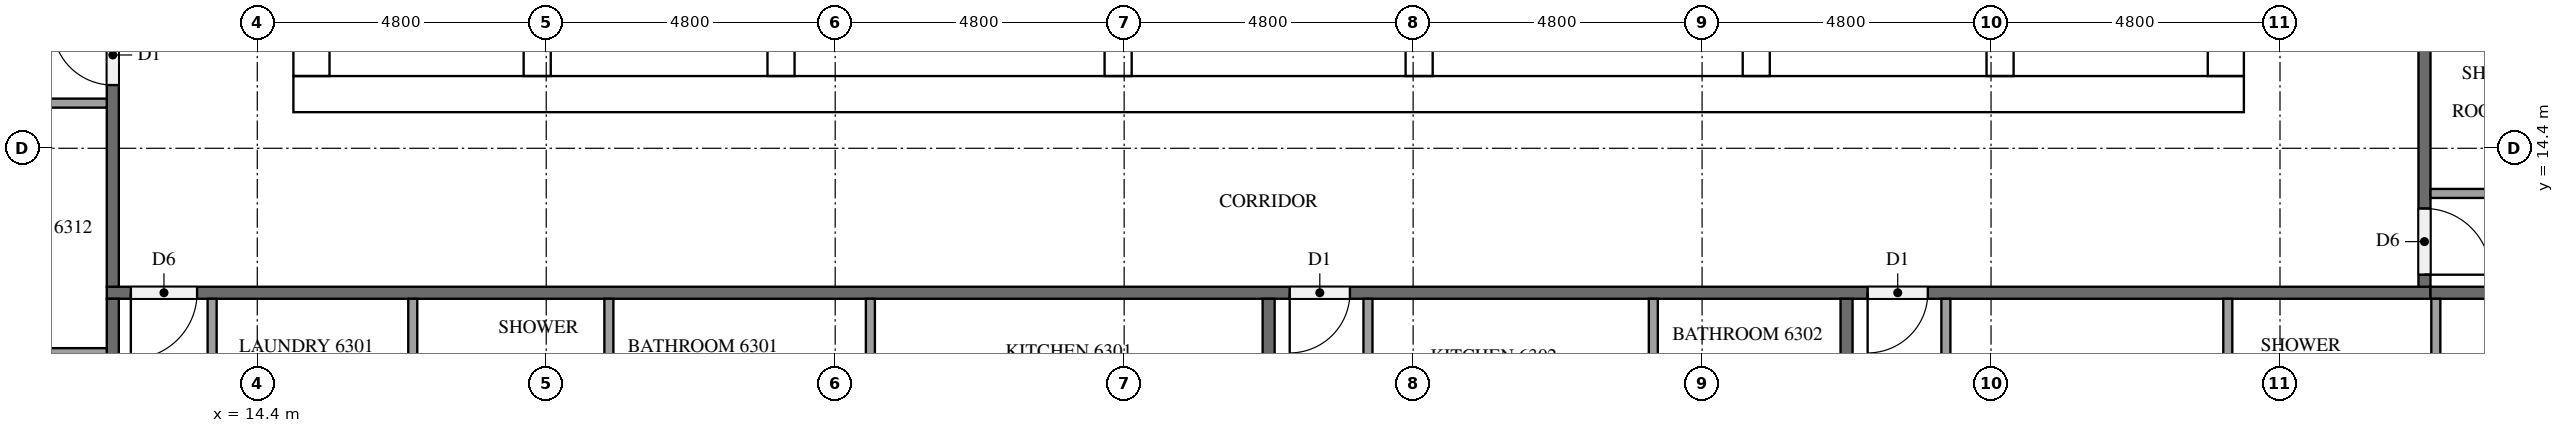
"""IFC4 building model, lengths in metres.
Left out: names, types, materials, properties, quantities, classifications, styles, units other than length and angle.
Written with IfcOpenShell. Run it as: python <this file> out.ifc"""

import sys

from ifc_helpers import new_model, si_unit, direction, frame, frame_2d, origin, place, context, subcontext, project, spatial, rectangle, extrude, element, fill, save


model = new_model("IFC4")
c1 = context("Model", 3, precision=1e-05, world=origin(), true_north=direction((0.0, 1.0)))
c2 = subcontext(c1, "Body", "Model", "MODEL_VIEW")
j1 = project(units=[si_unit("LENGTHUNIT", "METRE"), si_unit("PLANEANGLEUNIT", "RADIAN")], contexts=[c1])
p1 = place(None, origin())
s1 = spatial("IfcSite", under=j1, at=p1, CompositionType="ELEMENT")
p2 = place(p1, origin())
s2 = spatial("IfcBuilding", under=s1, at=p2, CompositionType="ELEMENT")
p3 = place(p2, frame((0.0, 0.0, 242.2)))
s3 = spatial("IfcBuildingStorey", under=s2, at=p3, CompositionType="ELEMENT", Elevation=242.2)
p4 = place(p3, frame((15.0, 15.3, 0.0), z_axis=(0.0, 0.0, 1.0), x_axis=(1.0, 0.0, 0.0)))
e1 = element("IfcWall", 1, at=p4, inside=s3, PredefinedType="SHEAR", context=c2, shape_type="SweptSolid", body=[
    extrude(rectangle(XDim=32.4, YDim=0.6, at=frame_2d((16.2, 0.0))), origin(), (0.0, 0.0, 1.0), 3.2),
])
p5 = place(p4, frame((15.3, 0.0, 0.0)))
e2 = element("IfcOpeningElement", 2, at=p5, cuts=e1, PredefinedType="OPENING", context=c2, shape_type="SweptSolid", body=[
    extrude(rectangle(XDim=1.8, YDim=2.1, at=frame_2d((0.9, 1.05))), frame((0.0, 0.31, 0.0), z_axis=(0.0, -1.0, 0.0), x_axis=(1.0, 0.0, 0.0)), (0.0, 0.0, 1.0), 0.62),
])
p6 = place(p3, frame((15.3, 15.6, 0.0), z_axis=(0.0, 0.0, 1.0), x_axis=(0.0, 1.0, 0.0)))
e3 = element("IfcWall", 3, at=p6, inside=s3, PredefinedType="SHEAR", context=c2, shape_type="SweptSolid", body=[
    extrude(rectangle(XDim=21.6, YDim=0.6, at=frame_2d((10.8, 0.0))), origin(), (0.0, 0.0, 1.0), 3.2),
])
p7 = place(p6, frame((5.16, 0.0, 0.0)))
e4 = element("IfcOpeningElement", 4, at=p7, cuts=e3, PredefinedType="OPENING", context=c2, shape_type="SweptSolid", body=[
    extrude(rectangle(XDim=1.2, YDim=2.1, at=frame_2d((0.6, 1.05))), frame((0.0, 0.31, 0.0), z_axis=(0.0, -1.0, 0.0), x_axis=(1.0, 0.0, 0.0)), (0.0, 0.0, 1.0), 0.62),
])
p8 = place(p3, frame((47.1, 15.6, 0.0), z_axis=(0.0, 0.0, 1.0), x_axis=(0.0, 1.0, 0.0)))
e5 = element("IfcWall", 5, at=p8, inside=s3, PredefinedType="SHEAR", context=c2, shape_type="SweptSolid", body=[
    extrude(rectangle(XDim=21.6, YDim=0.6, at=frame_2d((10.8, 0.0))), origin(), (0.0, 0.0, 1.0), 3.2),
])
p9 = place(p8, frame((10.5, 0.0, 0.0)))
e6 = element("IfcOpeningElement", 6, at=p9, cuts=e5, PredefinedType="OPENING", context=c2, shape_type="SweptSolid", body=[
    extrude(rectangle(XDim=1.2, YDim=2.1, at=frame_2d((0.6, 1.05))), frame((0.0, 0.31, 0.0), z_axis=(0.0, -1.0, 0.0), x_axis=(1.0, 0.0, 0.0)), (0.0, 0.0, 1.0), 0.62),
])
p10 = place(p3, frame((19.05, 15.6, 0.0), z_axis=(0.0, 0.0, 1.0), x_axis=(0.0, 1.0, 0.0)))
e7 = element("IfcWall", 7, at=p10, inside=s3, PredefinedType="SHEAR", context=c2, shape_type="SweptSolid", body=[
    extrude(rectangle(XDim=15.425, YDim=0.45, at=frame_2d((7.712, 0.0))), origin(), (0.0, 0.0, 1.0), 3.2),
])
p11 = place(p10, frame((9.85, 0.0, 0.0)))
e8 = element("IfcOpeningElement", 8, at=p11, cuts=e7, PredefinedType="OPENING", context=c2, shape_type="SweptSolid", body=[
    extrude(rectangle(XDim=1.1, YDim=2.1, at=frame_2d((0.55, 1.05))), frame((0.0, 0.235, 0.0), z_axis=(0.0, -1.0, 0.0), x_axis=(1.0, 0.0, 0.0)), (0.0, 0.0, 1.0), 0.47),
])
p12 = place(p10, frame((13.35, 0.0, 0.0)))
e9 = element("IfcOpeningElement", 9, at=p12, cuts=e7, PredefinedType="OPENING", context=c2, shape_type="SweptSolid", body=[
    extrude(rectangle(XDim=1.1, YDim=2.1, at=frame_2d((0.55, 1.05))), frame((0.0, 0.235, 0.0), z_axis=(0.0, -1.0, 0.0), x_axis=(1.0, 0.0, 0.0)), (0.0, 0.0, 1.0), 0.47),
])
p13 = place(p10, frame((0.6, 0.0, 0.0)))
e10 = element("IfcOpeningElement", 10, at=p13, cuts=e7, PredefinedType="OPENING", context=c2, shape_type="SweptSolid", body=[
    extrude(rectangle(XDim=1.2, YDim=2.1, at=frame_2d((0.6, 1.05))), frame((0.0, 0.235, 0.0), z_axis=(0.0, -1.0, 0.0), x_axis=(1.0, 0.0, 0.0)), (0.0, 0.0, 1.0), 0.47),
])
p14 = place(p3, frame((23.1, 15.6, 0.0), z_axis=(0.0, 0.0, 1.0), x_axis=(0.0, 1.0, 0.0)))
e11 = element("IfcWall", 11, at=p14, inside=s3, PredefinedType="SHEAR", context=c2, shape_type="SweptSolid", body=[
    extrude(rectangle(XDim=21.6, YDim=0.45, at=frame_2d((10.8, 0.0))), origin(), (0.0, 0.0, 1.0), 3.2),
])
p15 = place(p3, frame((39.3, 15.6, 0.0), z_axis=(0.0, 0.0, 1.0), x_axis=(0.0, 1.0, 0.0)))
e12 = element("IfcWall", 12, at=p15, inside=s3, PredefinedType="SHEAR", context=c2, shape_type="SweptSolid", body=[
    extrude(rectangle(XDim=8.65, YDim=0.45, at=frame_2d((4.325, 0.0))), origin(), (0.0, 0.0, 1.0), 3.2),
])
p16 = place(p3, frame((43.35, 15.6, 0.0), z_axis=(0.0, 0.0, 1.0), x_axis=(0.0, 1.0, 0.0)))
e13 = element("IfcWall", 13, at=p16, inside=s3, PredefinedType="SHEAR", context=c2, shape_type="SweptSolid", body=[
    extrude(rectangle(XDim=8.65, YDim=0.45, at=frame_2d((4.325, 0.0))), origin(), (0.0, 0.0, 1.0), 3.2),
])
p17 = place(p16, frame((0.6, 0.0, 0.0)))
e14 = element("IfcOpeningElement", 14, at=p17, cuts=e13, PredefinedType="OPENING", context=c2, shape_type="SweptSolid", body=[
    extrude(rectangle(XDim=1.2, YDim=2.1, at=frame_2d((0.6, 1.05))), frame((0.0, 0.235, 0.0), z_axis=(0.0, -1.0, 0.0), x_axis=(1.0, 0.0, 0.0)), (0.0, 0.0, 1.0), 0.47),
])
for number, where, z_axis, x_axis in (
    (15, (28.7, 15.6, 0.0), (0.0, 0.0, 1.0), (0.0, 1.0, 0.0)),
    (16, (33.7, 15.6, 0.0), (0.0, 0.0, 1.0), (0.0, 1.0, 0.0)),
):
    element("IfcWall", number, at=place(p3, frame(where, z_axis=z_axis, x_axis=x_axis)), inside=s3, PredefinedType="SHEAR", context=c2, shape_type="SweptSolid", body=[
        extrude(rectangle(XDim=2.925, YDim=0.45, at=frame_2d((1.462, 0.0))), origin(), (0.0, 0.0, 1.0), 3.2),
    ])
p18 = place(p3, frame((50.5, 12.0, 0.0), z_axis=(0.0, 0.0, 1.0), x_axis=(-1.0, 0.0, 0.0)))
e17 = element("IfcWall", 17, at=p18, inside=s3, PredefinedType="PARTITIONING", context=c2, shape_type="SweptSolid", body=[
    extrude(rectangle(XDim=38.6, YDim=0.2, at=frame_2d((19.3, 0.0))), origin(), (0.0, 0.0, 1.0), 3.2),
])
p19 = place(p18, frame((37.1, 0.0, 0.0)))
e18 = element("IfcOpeningElement", 18, at=p19, cuts=e17, PredefinedType="OPENING", context=c2, shape_type="SweptSolid", body=[
    extrude(rectangle(XDim=1.1, YDim=2.1, at=frame_2d((0.55, 1.05))), frame((0.0, 0.11, 0.0), z_axis=(0.0, -1.0, 0.0), x_axis=(1.0, 0.0, 0.0)), (0.0, 0.0, 1.0), 0.22),
])
p20 = place(p18, frame((17.95, 0.0, 0.0)))
e19 = element("IfcOpeningElement", 19, at=p20, cuts=e17, PredefinedType="OPENING", context=c2, shape_type="SweptSolid", body=[
    extrude(rectangle(XDim=1.0, YDim=2.1, at=frame_2d((0.5, 1.05))), frame((0.0, 0.11, 0.0), z_axis=(0.0, -1.0, 0.0), x_axis=(1.0, 0.0, 0.0)), (0.0, 0.0, 1.0), 0.22),
])
p21 = place(p18, frame((8.35, 0.0, 0.0)))
e20 = element("IfcOpeningElement", 20, at=p21, cuts=e17, PredefinedType="OPENING", context=c2, shape_type="SweptSolid", body=[
    extrude(rectangle(XDim=1.0, YDim=2.1, at=frame_2d((0.5, 1.05))), frame((0.0, 0.11, 0.0), z_axis=(0.0, -1.0, 0.0), x_axis=(1.0, 0.0, 0.0)), (0.0, 0.0, 1.0), 0.22),
])
p22 = place(p3, frame((50.4, 40.7, 0.0), z_axis=(0.0, 0.0, 1.0), x_axis=(0.0, -1.0, 0.0)))
e21 = element("IfcWall", 21, at=p22, inside=s3, PredefinedType="PARTITIONING", context=c2, shape_type="SweptSolid", body=[
    extrude(rectangle(XDim=28.6, YDim=0.2, at=frame_2d((14.3, 0.0))), origin(), (0.0, 0.0, 1.0), 3.2),
])
p23 = place(p22, frame((27.3, 0.0, 0.0)))
e22 = element("IfcOpeningElement", 22, at=p23, cuts=e21, PredefinedType="OPENING", context=c2, shape_type="SweptSolid", body=[
    extrude(rectangle(XDim=1.1, YDim=2.1, at=frame_2d((0.55, 1.05))), frame((0.0, 0.11, 0.0), z_axis=(0.0, -1.0, 0.0), x_axis=(1.0, 0.0, 0.0)), (0.0, 0.0, 1.0), 0.22),
])
p24 = place(p22, frame((0.25, 0.0, 0.0)))
e23 = element("IfcOpeningElement", 23, at=p24, cuts=e21, PredefinedType="OPENING", context=c2, shape_type="SweptSolid", body=[
    extrude(rectangle(XDim=1.0, YDim=2.1, at=frame_2d((0.5, 1.05))), frame((0.0, 0.11, 0.0), z_axis=(0.0, -1.0, 0.0), x_axis=(1.0, 0.0, 0.0)), (0.0, 0.0, 1.0), 0.22),
])
p25 = place(p3, frame((12.0, 12.1, 0.0), z_axis=(0.0, 0.0, 1.0), x_axis=(0.0, 1.0, 0.0)))
e24 = element("IfcWall", 24, at=p25, inside=s3, PredefinedType="PARTITIONING", context=c2, shape_type="SweptSolid", body=[
    extrude(rectangle(XDim=28.6, YDim=0.2, at=frame_2d((14.3, 0.0))), origin(), (0.0, 0.0, 1.0), 3.2),
])
p26 = place(p25, frame((27.35, 0.0, 0.0)))
e25 = element("IfcOpeningElement", 25, at=p26, cuts=e24, PredefinedType="OPENING", context=c2, shape_type="SweptSolid", body=[
    extrude(rectangle(XDim=1.0, YDim=2.1, at=frame_2d((0.5, 1.05))), frame((0.0, 0.11, 0.0), z_axis=(0.0, -1.0, 0.0), x_axis=(1.0, 0.0, 0.0)), (0.0, 0.0, 1.0), 0.22),
])
p27 = place(p25, frame((17.75, 0.0, 0.0)))
e26 = element("IfcOpeningElement", 26, at=p27, cuts=e24, PredefinedType="OPENING", context=c2, shape_type="SweptSolid", body=[
    extrude(rectangle(XDim=1.0, YDim=2.1, at=frame_2d((0.5, 1.05))), frame((0.0, 0.11, 0.0), z_axis=(0.0, -1.0, 0.0), x_axis=(1.0, 0.0, 0.0)), (0.0, 0.0, 1.0), 0.22),
])
p28 = place(p25, frame((3.35, 0.0, 0.0)))
e27 = element("IfcOpeningElement", 27, at=p28, cuts=e24, PredefinedType="OPENING", context=c2, shape_type="SweptSolid", body=[
    extrude(rectangle(XDim=1.0, YDim=2.1, at=frame_2d((0.5, 1.05))), frame((0.0, 0.11, 0.0), z_axis=(0.0, -1.0, 0.0), x_axis=(1.0, 0.0, 0.0)), (0.0, 0.0, 1.0), 0.22),
])
for number, where, z_axis, x_axis in (
    (28, (31.2, 11.9, 0.0), (0.0, 0.0, 1.0), (0.0, -1.0, 0.0)),
    (29, (12.0, 4.9, 0.0), (0.0, 0.0, 1.0), (0.0, 1.0, 0.0)),
    (30, (40.8, 11.9, 0.0), (0.0, 0.0, 1.0), (0.0, -1.0, 0.0)),
    (31, (50.5, 12.0, 0.0), (0.0, 0.0, 1.0), (1.0, 0.0, 0.0)),
):
    element("IfcWall", number, at=place(p3, frame(where, z_axis=z_axis, x_axis=x_axis)), inside=s3, PredefinedType="PARTITIONING", context=c2, shape_type="SweptSolid", body=[
        extrude(rectangle(XDim=7.0, YDim=0.2, at=frame_2d((3.5, 0.0))), origin(), (0.0, 0.0, 1.0), 3.2),
    ])
for number, where, z_axis, x_axis in (
    (32, (16.983, 11.9, 0.0), (0.0, 0.0, 1.0), (0.0, -1.0, 0.0)),
    (33, (20.24, 11.9, 0.0), (0.0, 0.0, 1.0), (0.0, -1.0, 0.0)),
    (34, (24.584, 11.9, 0.0), (0.0, 0.0, 1.0), (0.0, -1.0, 0.0)),
):
    element("IfcWall", number, at=place(p3, frame(where, z_axis=z_axis, x_axis=x_axis)), inside=s3, PredefinedType="PARTITIONING", context=c2, shape_type="SweptSolid", body=[
        extrude(rectangle(XDim=1.775, YDim=0.15, at=frame_2d((0.887, 0.0))), origin(), (0.0, 0.0, 1.0), 3.2),
    ])
for number, where, z_axis, x_axis in (
    (35, (13.65, 11.9, 0.0), (0.0, 0.0, 1.0), (0.0, -1.0, 0.0)),
    (36, (37.59, 11.9, 0.0), (0.0, 0.0, 1.0), (0.0, -1.0, 0.0)),
):
    element("IfcWall", number, at=place(p3, frame(where, z_axis=z_axis, x_axis=x_axis)), inside=s3, PredefinedType="PARTITIONING", context=c2, shape_type="SweptSolid", body=[
        extrude(rectangle(XDim=1.925, YDim=0.15, at=frame_2d((0.962, 0.0))), origin(), (0.0, 0.0, 1.0), 3.2),
    ])
for number, where, z_axis, x_axis in (
    (37, (32.85, 11.9, 0.0), (0.0, 0.0, 1.0), (0.0, -1.0, 0.0)),
    (38, (47.133, 11.9, 0.0), (0.0, 0.0, 1.0), (0.0, -1.0, 0.0)),
    (39, (50.588, 11.9, 0.0), (0.0, 0.0, 1.0), (0.0, -1.0, 0.0)),
):
    element("IfcWall", number, at=place(p3, frame(where, z_axis=z_axis, x_axis=x_axis)), inside=s3, PredefinedType="PARTITIONING", context=c2, shape_type="SweptSolid", body=[
        extrude(rectangle(XDim=2.075, YDim=0.15, at=frame_2d((1.038, 0.0))), origin(), (0.0, 0.0, 1.0), 3.2),
    ])
p29 = place(p3, frame((42.45, 11.9, 0.0), z_axis=(0.0, 0.0, 1.0), x_axis=(0.0, -1.0, 0.0)))
e40 = element("IfcWall", 40, at=p29, inside=s3, PredefinedType="PARTITIONING", context=c2, shape_type="SweptSolid", body=[
    extrude(rectangle(XDim=2.225, YDim=0.15, at=frame_2d((1.112, 0.0))), origin(), (0.0, 0.0, 1.0), 3.2),
])
p30 = place(p3, frame((50.5, 13.65, 0.0), z_axis=(0.0, 0.0, 1.0), x_axis=(1.0, 0.0, 0.0)))
e41 = element("IfcWall", 41, at=p30, inside=s3, PredefinedType="PARTITIONING", context=c2, shape_type="SweptSolid", body=[
    extrude(rectangle(XDim=2.525, YDim=0.15, at=frame_2d((1.262, 0.0))), origin(), (0.0, 0.0, 1.0), 3.2),
])
p31 = place(p3, frame((11.9, 11.005, 0.0), z_axis=(0.0, 0.0, 1.0), x_axis=(-1.0, 0.0, 0.0)))
e42 = element("IfcWall", 42, at=p31, inside=s3, PredefinedType="PARTITIONING", context=c2, shape_type="SweptSolid", body=[
    extrude(rectangle(XDim=2.975, YDim=0.15, at=frame_2d((1.487, 0.0))), origin(), (0.0, 0.0, 1.0), 3.2),
])
p32 = place(p3, frame((11.9, 15.15, 0.0), z_axis=(0.0, 0.0, 1.0), x_axis=(-1.0, 0.0, 0.0)))
e43 = element("IfcWall", 43, at=p32, inside=s3, PredefinedType="PARTITIONING", context=c2, shape_type="SweptSolid", body=[
    extrude(rectangle(XDim=3.125, YDim=0.15, at=frame_2d((1.562, 0.0))), origin(), (0.0, 0.0, 1.0), 3.2),
])
p33 = place(p5, frame((1.8, 0.0, 0.0), z_axis=(0.0, 0.0, 1.0), x_axis=(-1.0, 0.0, 0.0)))
e44 = element("IfcDoor", 44, at=p33, inside=s3, OperationType="DOUBLE_DOOR_SINGLE_SWING", PredefinedType="DOOR", context=c2, shape_type="SweptSolid", body=[
    extrude(rectangle(XDim=1.8, YDim=2.1, at=frame_2d((0.9, 1.05))), frame((0.0, 0.025, 0.0), z_axis=(0.0, -1.0, 0.0), x_axis=(1.0, 0.0, 0.0)), (0.0, 0.0, 1.0), 0.05),
])
fill(e2, e44)
p34 = place(p19, origin())
e45 = element("IfcDoor", 45, at=p34, inside=s3, OperationType="SINGLE_SWING_RIGHT", PredefinedType="DOOR", context=c2, shape_type="SweptSolid", body=[
    extrude(rectangle(XDim=1.1, YDim=2.1, at=frame_2d((0.55, 1.05))), frame((0.0, 0.025, 0.0), z_axis=(0.0, -1.0, 0.0), x_axis=(1.0, 0.0, 0.0)), (0.0, 0.0, 1.0), 0.05),
])
fill(e18, e45)
p35 = place(p20, origin())
e46 = element("IfcDoor", 46, at=p35, inside=s3, OperationType="SINGLE_SWING_RIGHT", PredefinedType="DOOR", context=c2, shape_type="SweptSolid", body=[
    extrude(rectangle(XDim=1.0, YDim=2.1, at=frame_2d((0.5, 1.05))), frame((0.0, 0.025, 0.0), z_axis=(0.0, -1.0, 0.0), x_axis=(1.0, 0.0, 0.0)), (0.0, 0.0, 1.0), 0.05),
])
fill(e19, e46)
p36 = place(p21, origin())
e47 = element("IfcDoor", 47, at=p36, inside=s3, OperationType="SINGLE_SWING_RIGHT", PredefinedType="DOOR", context=c2, shape_type="SweptSolid", body=[
    extrude(rectangle(XDim=1.0, YDim=2.1, at=frame_2d((0.5, 1.05))), frame((0.0, 0.025, 0.0), z_axis=(0.0, -1.0, 0.0), x_axis=(1.0, 0.0, 0.0)), (0.0, 0.0, 1.0), 0.05),
])
fill(e20, e47)
p37 = place(p23, origin())
e48 = element("IfcDoor", 48, at=p37, inside=s3, OperationType="SINGLE_SWING_RIGHT", PredefinedType="DOOR", context=c2, shape_type="SweptSolid", body=[
    extrude(rectangle(XDim=1.1, YDim=2.1, at=frame_2d((0.55, 1.05))), frame((0.0, 0.025, 0.0), z_axis=(0.0, -1.0, 0.0), x_axis=(1.0, 0.0, 0.0)), (0.0, 0.0, 1.0), 0.05),
])
fill(e22, e48)
p38 = place(p28, origin())
e49 = element("IfcDoor", 49, at=p38, inside=s3, OperationType="SINGLE_SWING_RIGHT", PredefinedType="DOOR", context=c2, shape_type="SweptSolid", body=[
    extrude(rectangle(XDim=1.0, YDim=2.1, at=frame_2d((0.5, 1.05))), frame((0.0, 0.025, 0.0), z_axis=(0.0, -1.0, 0.0), x_axis=(1.0, 0.0, 0.0)), (0.0, 0.0, 1.0), 0.05),
])
fill(e27, e49)
save(model, sys.argv[1])
